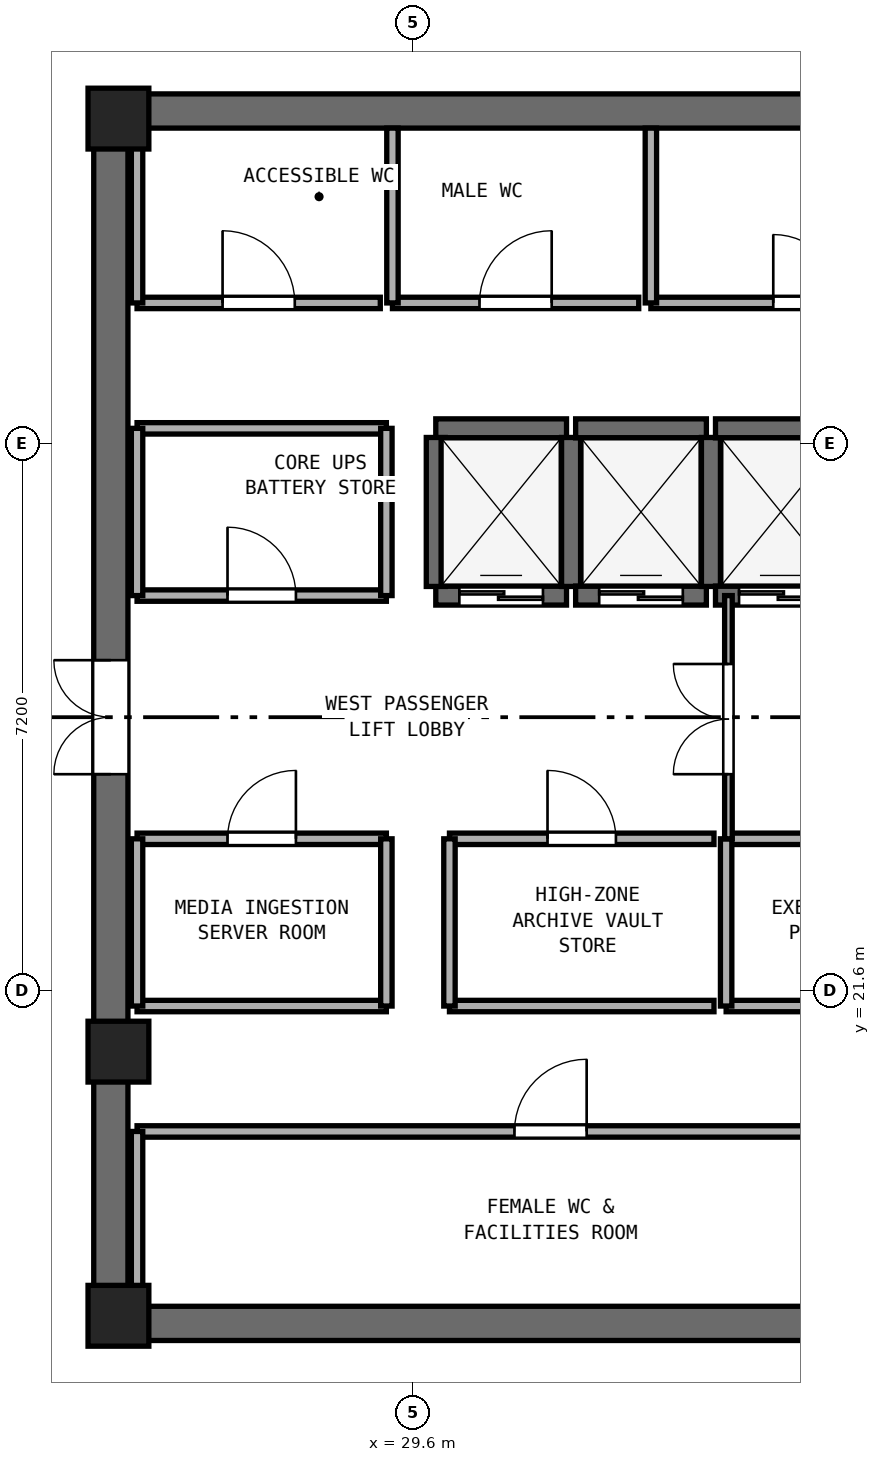
"""IFC4 building model, lengths in metres.
Left out: names, types, materials, properties, quantities, classifications, styles, units other than length and angle.
Written with IfcOpenShell. Run it as: python <this file> out.ifc"""

import sys

from ifc_helpers import new_model, si_unit, direction, frame, frame_2d, origin, origin_2d, place, context, subcontext, project, spatial, rectangle, extrude, element, fill, save


model = new_model("IFC4")
c1 = context("Model", 3, precision=1e-05, world=origin(), true_north=direction((0.0, 1.0)))
c2 = subcontext(c1, "Body", "Model", "MODEL_VIEW")
j1 = project(units=[si_unit("LENGTHUNIT", "METRE"), si_unit("PLANEANGLEUNIT", "RADIAN")], contexts=[c1])
p1 = place(None, origin())
s1 = spatial("IfcSite", under=j1, at=p1, CompositionType="ELEMENT")
p2 = place(p1, origin())
s2 = spatial("IfcBuilding", under=s1, at=p2, CompositionType="ELEMENT")
p3 = place(p2, frame((0.0, 0.0, 278.2)))
s3 = spatial("IfcBuildingStorey", under=s2, at=p3, CompositionType="ELEMENT", Elevation=278.2)
for number, where, z_axis, x_axis in (
    (1, (25.4, 17.225, 0.0), (0.0, 0.0, 1.0), (1.0, 0.0, 0.0)),
    (2, (25.4, 33.175, 0.0), (0.0, 0.0, 1.0), (1.0, 0.0, 0.0)),
):
    element("IfcWall", number, at=place(p3, frame(where, z_axis=z_axis, x_axis=x_axis)), inside=s3, PredefinedType="SHEAR", context=c2, shape_type="SweptSolid", body=[
        extrude(rectangle(XDim=23.2, YDim=0.45, at=frame_2d((11.6, 0.0))), origin(), (0.0, 0.0, 1.0), 3.54),
    ])
p4 = place(p3, frame((25.625, 17.45, 0.0), z_axis=(0.0, 0.0, 1.0), x_axis=(0.0, 1.0, 0.0)))
e3 = element("IfcWall", 3, at=p4, inside=s3, PredefinedType="SHEAR", context=c2, shape_type="SweptSolid", body=[
    extrude(rectangle(XDim=15.5, YDim=0.45, at=frame_2d((7.75, 0.0))), origin(), (0.0, 0.0, 1.0), 3.54),
])
p5 = place(p4, frame((7.0, 0.0, 0.0)))
e4 = element("IfcOpeningElement", 4, at=p5, cuts=e3, PredefinedType="OPENING", context=c2, shape_type="SweptSolid", body=[
    extrude(rectangle(XDim=1.5, YDim=2.15, at=frame_2d((0.75, 1.075))), frame((0.0, 0.235, 0.0), z_axis=(0.0, -1.0, 0.0), x_axis=(1.0, 0.0, 0.0)), (0.0, 0.0, 1.0), 0.47),
])
for number, where, z_axis, x_axis in (
    (5, (25.725, 17.325, 0.0), (0.0, 0.0, 1.0), (1.0, 0.0, 0.0)),
    (6, (25.725, 33.075, 0.0), (0.0, 0.0, 1.0), (1.0, 0.0, 0.0)),
    (7, (25.725, 20.8, 0.0), (0.0, 0.0, 1.0), (1.0, 0.0, 0.0)),
):
    element("IfcColumn", number, at=place(p3, frame(where, z_axis=z_axis, x_axis=x_axis)), inside=s3, PredefinedType="PILASTER", context=c2, shape_type="SweptSolid", body=[
        extrude(rectangle(XDim=0.8, YDim=0.8, at=origin_2d()), origin(), (0.0, 0.0, 1.0), 3.8),
    ])
p6 = place(p3, frame((29.9, 26.8, 0.0), z_axis=(0.0, 0.0, 1.0), x_axis=(1.0, 0.0, 0.0)))
e8 = element("IfcWall", 8, at=p6, inside=s3, PredefinedType="SHEAR", context=c2, shape_type="SweptSolid", body=[
    extrude(rectangle(XDim=1.72, YDim=0.25, at=frame_2d((0.86, 0.0))), origin(), (0.0, 0.0, 1.0), 3.54),
])
p7 = place(p6, frame((0.31, 0.0, 0.0)))
e9 = element("IfcOpeningElement", 9, at=p7, cuts=e8, PredefinedType="OPENING", context=c2, shape_type="SweptSolid", body=[
    extrude(rectangle(XDim=1.1, YDim=2.15, at=frame_2d((0.55, 1.075))), frame((0.0, 0.135, 0.0), z_axis=(0.0, -1.0, 0.0), x_axis=(1.0, 0.0, 0.0)), (0.0, 0.0, 1.0), 0.27),
])
p8 = place(p3, frame((29.9, 29.0, 0.0), z_axis=(0.0, 0.0, 1.0), x_axis=(1.0, 0.0, 0.0)))
e10 = element("IfcWall", 10, at=p8, inside=s3, PredefinedType="SHEAR", context=c2, shape_type="SweptSolid", body=[
    extrude(rectangle(XDim=1.72, YDim=0.25, at=frame_2d((0.86, 0.0))), origin(), (0.0, 0.0, 1.0), 3.54),
])
for number, where, z_axis, x_axis in (
    (11, (29.9, 26.92, 0.0), (0.0, 0.0, 1.0), (0.0, 1.0, 0.0)),
    (12, (31.68, 26.92, 0.0), (0.0, 0.0, 1.0), (0.0, 1.0, 0.0)),
):
    element("IfcWall", number, at=place(p3, frame(where, z_axis=z_axis, x_axis=x_axis)), inside=s3, PredefinedType="SHEAR", context=c2, shape_type="SweptSolid", body=[
        extrude(rectangle(XDim=1.96, YDim=0.25, at=frame_2d((0.98, 0.0))), origin(), (0.0, 0.0, 1.0), 3.54),
    ])
p9 = place(p3, frame((31.74, 26.8, 0.0), z_axis=(0.0, 0.0, 1.0), x_axis=(1.0, 0.0, 0.0)))
e13 = element("IfcWall", 13, at=p9, inside=s3, PredefinedType="SHEAR", context=c2, shape_type="SweptSolid", body=[
    extrude(rectangle(XDim=1.72, YDim=0.25, at=frame_2d((0.86, 0.0))), origin(), (0.0, 0.0, 1.0), 3.54),
])
p10 = place(p9, frame((0.31, 0.0, 0.0)))
e14 = element("IfcOpeningElement", 14, at=p10, cuts=e13, PredefinedType="OPENING", context=c2, shape_type="SweptSolid", body=[
    extrude(rectangle(XDim=1.1, YDim=2.15, at=frame_2d((0.55, 1.075))), frame((0.0, 0.135, 0.0), z_axis=(0.0, -1.0, 0.0), x_axis=(1.0, 0.0, 0.0)), (0.0, 0.0, 1.0), 0.27),
])
p11 = place(p3, frame((31.74, 29.0, 0.0), z_axis=(0.0, 0.0, 1.0), x_axis=(1.0, 0.0, 0.0)))
e15 = element("IfcWall", 15, at=p11, inside=s3, PredefinedType="SHEAR", context=c2, shape_type="SweptSolid", body=[
    extrude(rectangle(XDim=1.72, YDim=0.25, at=frame_2d((0.86, 0.0))), origin(), (0.0, 0.0, 1.0), 3.54),
])
p12 = place(p3, frame((33.52, 26.92, 0.0), z_axis=(0.0, 0.0, 1.0), x_axis=(0.0, 1.0, 0.0)))
e16 = element("IfcWall", 16, at=p12, inside=s3, PredefinedType="SHEAR", context=c2, shape_type="SweptSolid", body=[
    extrude(rectangle(XDim=1.96, YDim=0.25, at=frame_2d((0.98, 0.0))), origin(), (0.0, 0.0, 1.0), 3.54),
])
p13 = place(p3, frame((33.58, 26.8, 0.0), z_axis=(0.0, 0.0, 1.0), x_axis=(1.0, 0.0, 0.0)))
e17 = element("IfcWall", 17, at=p13, inside=s3, PredefinedType="SHEAR", context=c2, shape_type="SweptSolid", body=[
    extrude(rectangle(XDim=1.72, YDim=0.25, at=frame_2d((0.86, 0.0))), origin(), (0.0, 0.0, 1.0), 3.54),
])
p14 = place(p13, frame((0.31, 0.0, 0.0)))
e18 = element("IfcOpeningElement", 18, at=p14, cuts=e17, PredefinedType="OPENING", context=c2, shape_type="SweptSolid", body=[
    extrude(rectangle(XDim=1.1, YDim=2.15, at=frame_2d((0.55, 1.075))), frame((0.0, 0.135, 0.0), z_axis=(0.0, -1.0, 0.0), x_axis=(1.0, 0.0, 0.0)), (0.0, 0.0, 1.0), 0.27),
])
p15 = place(p3, frame((33.58, 29.0, 0.0), z_axis=(0.0, 0.0, 1.0), x_axis=(1.0, 0.0, 0.0)))
e19 = element("IfcWall", 19, at=p15, inside=s3, PredefinedType="SHEAR", context=c2, shape_type="SweptSolid", body=[
    extrude(rectangle(XDim=1.72, YDim=0.25, at=frame_2d((0.86, 0.0))), origin(), (0.0, 0.0, 1.0), 3.54),
])
p16 = place(p3, frame((25.97, 30.65, 0.0), z_axis=(0.0, 0.0, 1.0), x_axis=(1.0, 0.0, 0.0)))
e20 = element("IfcWall", 20, at=p16, inside=s3, PredefinedType="PARTITIONING", context=c2, shape_type="SweptSolid", body=[
    extrude(rectangle(XDim=3.2, YDim=0.15, at=frame_2d((1.6, 0.0))), origin(), (0.0, 0.0, 1.0), 3.54),
])
p17 = place(p16, frame((1.125, 0.0, 0.0)))
e21 = element("IfcOpeningElement", 21, at=p17, cuts=e20, PredefinedType="OPENING", context=c2, shape_type="SweptSolid", body=[
    extrude(rectangle(XDim=0.95, YDim=2.1, at=frame_2d((0.475, 1.05))), frame((0.0, 0.085, 0.0), z_axis=(0.0, -1.0, 0.0), x_axis=(1.0, 0.0, 0.0)), (0.0, 0.0, 1.0), 0.17),
])
p18 = place(p3, frame((25.97, 30.65, 0.0), z_axis=(0.0, 0.0, 1.0), x_axis=(0.0, 1.0, 0.0)))
e22 = element("IfcWall", 22, at=p18, inside=s3, PredefinedType="PARTITIONING", context=c2, shape_type="SweptSolid", body=[
    extrude(rectangle(XDim=2.3, YDim=0.15, at=frame_2d((1.15, 0.0))), origin(), (0.0, 0.0, 1.0), 2.64),
])
p19 = place(p3, frame((29.33, 30.65, 0.0), z_axis=(0.0, 0.0, 1.0), x_axis=(1.0, 0.0, 0.0)))
e23 = element("IfcWall", 23, at=p19, inside=s3, PredefinedType="PARTITIONING", context=c2, shape_type="SweptSolid", body=[
    extrude(rectangle(XDim=3.24, YDim=0.15, at=frame_2d((1.62, 0.0))), origin(), (0.0, 0.0, 1.0), 3.54),
])
p20 = place(p19, frame((1.145, 0.0, 0.0)))
e24 = element("IfcOpeningElement", 24, at=p20, cuts=e23, PredefinedType="OPENING", context=c2, shape_type="SweptSolid", body=[
    extrude(rectangle(XDim=0.95, YDim=2.1, at=frame_2d((0.475, 1.05))), frame((0.0, 0.085, 0.0), z_axis=(0.0, -1.0, 0.0), x_axis=(1.0, 0.0, 0.0)), (0.0, 0.0, 1.0), 0.17),
])
p21 = place(p3, frame((29.33, 30.65, 0.0), z_axis=(0.0, 0.0, 1.0), x_axis=(0.0, 1.0, 0.0)))
e25 = element("IfcWall", 25, at=p21, inside=s3, PredefinedType="PARTITIONING", context=c2, shape_type="SweptSolid", body=[
    extrude(rectangle(XDim=2.3, YDim=0.15, at=frame_2d((1.15, 0.0))), origin(), (0.0, 0.0, 1.0), 3.54),
])
p22 = place(p3, frame((32.73, 30.65, 0.0), z_axis=(0.0, 0.0, 1.0), x_axis=(1.0, 0.0, 0.0)))
e26 = element("IfcWall", 26, at=p22, inside=s3, PredefinedType="PARTITIONING", context=c2, shape_type="SweptSolid", body=[
    extrude(rectangle(XDim=4.12, YDim=0.15, at=frame_2d((2.06, 0.0))), origin(), (0.0, 0.0, 1.0), 3.54),
])
p23 = place(p22, frame((1.61, 0.0, 0.0)))
e27 = element("IfcOpeningElement", 27, at=p23, cuts=e26, PredefinedType="OPENING", context=c2, shape_type="SweptSolid", body=[
    extrude(rectangle(XDim=0.9, YDim=2.1, at=frame_2d((0.45, 1.05))), frame((0.0, 0.085, 0.0), z_axis=(0.0, -1.0, 0.0), x_axis=(1.0, 0.0, 0.0)), (0.0, 0.0, 1.0), 0.17),
])
p24 = place(p3, frame((32.73, 30.65, 0.0), z_axis=(0.0, 0.0, 1.0), x_axis=(0.0, 1.0, 0.0)))
e28 = element("IfcWall", 28, at=p24, inside=s3, PredefinedType="PARTITIONING", context=c2, shape_type="SweptSolid", body=[
    extrude(rectangle(XDim=2.3, YDim=0.15, at=frame_2d((1.15, 0.0))), origin(), (0.0, 0.0, 1.0), 3.54),
])
p25 = place(p3, frame((25.97, 19.75, 0.0), z_axis=(0.0, 0.0, 1.0), x_axis=(1.0, 0.0, 0.0)))
e29 = element("IfcWall", 29, at=p25, inside=s3, PredefinedType="PARTITIONING", context=c2, shape_type="SweptSolid", body=[
    extrude(rectangle(XDim=10.88, YDim=0.15, at=frame_2d((5.44, 0.0))), origin(), (0.0, 0.0, 1.0), 3.54),
])
p26 = place(p25, frame((4.965, 0.0, 0.0)))
e30 = element("IfcOpeningElement", 30, at=p26, cuts=e29, PredefinedType="OPENING", context=c2, shape_type="SweptSolid", body=[
    extrude(rectangle(XDim=0.95, YDim=2.1, at=frame_2d((0.475, 1.05))), frame((0.0, 0.085, 0.0), z_axis=(0.0, -1.0, 0.0), x_axis=(1.0, 0.0, 0.0)), (0.0, 0.0, 1.0), 0.17),
])
p27 = place(p3, frame((25.97, 17.45, 0.0), z_axis=(0.0, 0.0, 1.0), x_axis=(0.0, 1.0, 0.0)))
e31 = element("IfcWall", 31, at=p27, inside=s3, PredefinedType="PARTITIONING", context=c2, shape_type="SweptSolid", body=[
    extrude(rectangle(XDim=2.3, YDim=0.15, at=frame_2d((1.15, 0.0))), origin(), (0.0, 0.0, 1.0), 2.64),
])
p28 = place(p3, frame((25.97, 26.8, 0.0), z_axis=(0.0, 0.0, 1.0), x_axis=(1.0, 0.0, 0.0)))
e32 = element("IfcWall", 32, at=p28, inside=s3, PredefinedType="PARTITIONING", context=c2, shape_type="SweptSolid", body=[
    extrude(rectangle(XDim=3.28, YDim=0.15, at=frame_2d((1.64, 0.0))), origin(), (0.0, 0.0, 1.0), 3.54),
])
p29 = place(p28, frame((1.19, 0.0, 0.0)))
e33 = element("IfcOpeningElement", 33, at=p29, cuts=e32, PredefinedType="OPENING", context=c2, shape_type="SweptSolid", body=[
    extrude(rectangle(XDim=0.9, YDim=2.1, at=frame_2d((0.45, 1.05))), frame((0.0, 0.085, 0.0), z_axis=(0.0, -1.0, 0.0), x_axis=(1.0, 0.0, 0.0)), (0.0, 0.0, 1.0), 0.17),
])
p30 = place(p3, frame((25.97, 29.0, 0.0), z_axis=(0.0, 0.0, 1.0), x_axis=(1.0, 0.0, 0.0)))
e34 = element("IfcWall", 34, at=p30, inside=s3, PredefinedType="PARTITIONING", context=c2, shape_type="SweptSolid", body=[
    extrude(rectangle(XDim=3.28, YDim=0.15, at=frame_2d((1.64, 0.0))), origin(), (0.0, 0.0, 1.0), 3.54),
])
p31 = place(p3, frame((25.97, 26.8, 0.0), z_axis=(0.0, 0.0, 1.0), x_axis=(0.0, 1.0, 0.0)))
e35 = element("IfcWall", 35, at=p31, inside=s3, PredefinedType="PARTITIONING", context=c2, shape_type="SweptSolid", body=[
    extrude(rectangle(XDim=2.2, YDim=0.15, at=frame_2d((1.1, 0.0))), origin(), (0.0, 0.0, 1.0), 2.64),
])
p32 = place(p3, frame((29.25, 26.8, 0.0), z_axis=(0.0, 0.0, 1.0), x_axis=(0.0, 1.0, 0.0)))
e36 = element("IfcWall", 36, at=p32, inside=s3, PredefinedType="PARTITIONING", context=c2, shape_type="SweptSolid", body=[
    extrude(rectangle(XDim=2.2, YDim=0.15, at=frame_2d((1.1, 0.0))), origin(), (0.0, 0.0, 1.0), 3.54),
])
p33 = place(p3, frame((25.97, 21.4, 0.0), z_axis=(0.0, 0.0, 1.0), x_axis=(1.0, 0.0, 0.0)))
e37 = element("IfcWall", 37, at=p33, inside=s3, PredefinedType="PARTITIONING", context=c2, shape_type="SweptSolid", body=[
    extrude(rectangle(XDim=3.28, YDim=0.15, at=frame_2d((1.64, 0.0))), origin(), (0.0, 0.0, 1.0), 3.54),
])
p34 = place(p3, frame((25.97, 23.6, 0.0), z_axis=(0.0, 0.0, 1.0), x_axis=(1.0, 0.0, 0.0)))
e38 = element("IfcWall", 38, at=p34, inside=s3, PredefinedType="PARTITIONING", context=c2, shape_type="SweptSolid", body=[
    extrude(rectangle(XDim=3.28, YDim=0.15, at=frame_2d((1.64, 0.0))), origin(), (0.0, 0.0, 1.0), 3.54),
])
p35 = place(p34, frame((1.19, 0.0, 0.0)))
e39 = element("IfcOpeningElement", 39, at=p35, cuts=e38, PredefinedType="OPENING", context=c2, shape_type="SweptSolid", body=[
    extrude(rectangle(XDim=0.9, YDim=2.1, at=frame_2d((0.45, 1.05))), frame((0.0, 0.085, 0.0), z_axis=(0.0, -1.0, 0.0), x_axis=(1.0, 0.0, 0.0)), (0.0, 0.0, 1.0), 0.17),
])
p36 = place(p3, frame((25.97, 21.4, 0.0), z_axis=(0.0, 0.0, 1.0), x_axis=(0.0, 1.0, 0.0)))
e40 = element("IfcWall", 40, at=p36, inside=s3, PredefinedType="PARTITIONING", context=c2, shape_type="SweptSolid", body=[
    extrude(rectangle(XDim=2.2, YDim=0.15, at=frame_2d((1.1, 0.0))), origin(), (0.0, 0.0, 1.0), 2.64),
])
p37 = place(p3, frame((29.25, 21.4, 0.0), z_axis=(0.0, 0.0, 1.0), x_axis=(0.0, 1.0, 0.0)))
e41 = element("IfcWall", 41, at=p37, inside=s3, PredefinedType="PARTITIONING", context=c2, shape_type="SweptSolid", body=[
    extrude(rectangle(XDim=2.2, YDim=0.15, at=frame_2d((1.1, 0.0))), origin(), (0.0, 0.0, 1.0), 3.54),
])
p38 = place(p3, frame((30.08, 21.4, 0.0), z_axis=(0.0, 0.0, 1.0), x_axis=(1.0, 0.0, 0.0)))
e42 = element("IfcWall", 42, at=p38, inside=s3, PredefinedType="PARTITIONING", context=c2, shape_type="SweptSolid", body=[
    extrude(rectangle(XDim=3.48, YDim=0.15, at=frame_2d((1.74, 0.0))), origin(), (0.0, 0.0, 1.0), 3.54),
])
p39 = place(p3, frame((30.08, 23.6, 0.0), z_axis=(0.0, 0.0, 1.0), x_axis=(1.0, 0.0, 0.0)))
e43 = element("IfcWall", 43, at=p39, inside=s3, PredefinedType="PARTITIONING", context=c2, shape_type="SweptSolid", body=[
    extrude(rectangle(XDim=3.48, YDim=0.15, at=frame_2d((1.74, 0.0))), origin(), (0.0, 0.0, 1.0), 3.54),
])
p40 = place(p39, frame((1.29, 0.0, 0.0)))
e44 = element("IfcOpeningElement", 44, at=p40, cuts=e43, PredefinedType="OPENING", context=c2, shape_type="SweptSolid", body=[
    extrude(rectangle(XDim=0.9, YDim=2.1, at=frame_2d((0.45, 1.05))), frame((0.0, 0.085, 0.0), z_axis=(0.0, -1.0, 0.0), x_axis=(1.0, 0.0, 0.0)), (0.0, 0.0, 1.0), 0.17),
])
p41 = place(p3, frame((30.08, 21.4, 0.0), z_axis=(0.0, 0.0, 1.0), x_axis=(0.0, 1.0, 0.0)))
e45 = element("IfcWall", 45, at=p41, inside=s3, PredefinedType="PARTITIONING", context=c2, shape_type="SweptSolid", body=[
    extrude(rectangle(XDim=2.2, YDim=0.15, at=frame_2d((1.1, 0.0))), origin(), (0.0, 0.0, 1.0), 3.54),
])
p42 = place(p3, frame((33.72, 21.4, 0.0), z_axis=(0.0, 0.0, 1.0), x_axis=(1.0, 0.0, 0.0)))
e46 = element("IfcWall", 46, at=p42, inside=s3, PredefinedType="PARTITIONING", context=c2, shape_type="SweptSolid", body=[
    extrude(rectangle(XDim=3.48, YDim=0.15, at=frame_2d((1.74, 0.0))), origin(), (0.0, 0.0, 1.0), 3.54),
])
p43 = place(p3, frame((33.72, 23.6, 0.0), z_axis=(0.0, 0.0, 1.0), x_axis=(1.0, 0.0, 0.0)))
e47 = element("IfcWall", 47, at=p43, inside=s3, PredefinedType="PARTITIONING", context=c2, shape_type="SweptSolid", body=[
    extrude(rectangle(XDim=3.48, YDim=0.15, at=frame_2d((1.74, 0.0))), origin(), (0.0, 0.0, 1.0), 3.54),
])
p44 = place(p43, frame((1.29, 0.0, 0.0)))
e48 = element("IfcOpeningElement", 48, at=p44, cuts=e47, PredefinedType="OPENING", context=c2, shape_type="SweptSolid", body=[
    extrude(rectangle(XDim=0.9, YDim=2.1, at=frame_2d((0.45, 1.05))), frame((0.0, 0.085, 0.0), z_axis=(0.0, -1.0, 0.0), x_axis=(1.0, 0.0, 0.0)), (0.0, 0.0, 1.0), 0.17),
])
p45 = place(p3, frame((33.72, 21.4, 0.0), z_axis=(0.0, 0.0, 1.0), x_axis=(0.0, 1.0, 0.0)))
e49 = element("IfcWall", 49, at=p45, inside=s3, PredefinedType="PARTITIONING", context=c2, shape_type="SweptSolid", body=[
    extrude(rectangle(XDim=2.2, YDim=0.15, at=frame_2d((1.1, 0.0))), origin(), (0.0, 0.0, 1.0), 3.54),
])
p46 = place(p3, frame((33.75, 23.6, 0.0), z_axis=(0.0, 0.0, 1.0), x_axis=(0.0, 1.0, 0.0)))
e50 = element("IfcWall", 50, at=p46, inside=s3, PredefinedType="PARTITIONING", context=c2, shape_type="SweptSolid", body=[
    extrude(rectangle(XDim=3.2, YDim=0.1, at=frame_2d((1.6, 0.0))), origin(), (0.0, 0.0, 1.0), 3.54),
])
p47 = place(p46, frame((0.85, 0.0, 0.0)))
e51 = element("IfcOpeningElement", 51, at=p47, cuts=e50, PredefinedType="OPENING", context=c2, shape_type="SweptSolid", body=[
    extrude(rectangle(XDim=1.45, YDim=2.12, at=frame_2d((0.725, 1.06))), frame((0.0, 0.06, 0.0), z_axis=(0.0, -1.0, 0.0), x_axis=(1.0, 0.0, 0.0)), (0.0, 0.0, 1.0), 0.12),
])
p48 = place(p7, origin())
e52 = element("IfcDoor", 52, at=p48, inside=s3, OperationType="DOUBLE_DOOR_SLIDING", PredefinedType="DOOR", context=c2, shape_type="SweptSolid", body=[
    extrude(rectangle(XDim=1.1, YDim=2.15, at=frame_2d((0.55, 1.075))), frame((0.0, 0.025, 0.0), z_axis=(0.0, -1.0, 0.0), x_axis=(1.0, 0.0, 0.0)), (0.0, 0.0, 1.0), 0.05),
])
fill(e9, e52)
p49 = place(p10, origin())
e53 = element("IfcDoor", 53, at=p49, inside=s3, OperationType="DOUBLE_DOOR_SLIDING", PredefinedType="DOOR", context=c2, shape_type="SweptSolid", body=[
    extrude(rectangle(XDim=1.1, YDim=2.15, at=frame_2d((0.55, 1.075))), frame((0.0, 0.025, 0.0), z_axis=(0.0, -1.0, 0.0), x_axis=(1.0, 0.0, 0.0)), (0.0, 0.0, 1.0), 0.05),
])
fill(e14, e53)
p50 = place(p14, origin())
e54 = element("IfcDoor", 54, at=p50, inside=s3, OperationType="DOUBLE_DOOR_SLIDING", PredefinedType="DOOR", context=c2, shape_type="SweptSolid", body=[
    extrude(rectangle(XDim=1.1, YDim=2.15, at=frame_2d((0.55, 1.075))), frame((0.0, 0.025, 0.0), z_axis=(0.0, -1.0, 0.0), x_axis=(1.0, 0.0, 0.0)), (0.0, 0.0, 1.0), 0.05),
])
fill(e18, e54)
p51 = place(p5, origin())
e55 = element("IfcDoor", 55, at=p51, inside=s3, OperationType="DOUBLE_DOOR_SINGLE_SWING", PredefinedType="DOOR", context=c2, shape_type="SweptSolid", body=[
    extrude(rectangle(XDim=1.5, YDim=2.15, at=frame_2d((0.75, 1.075))), frame((0.0, 0.025, 0.0), z_axis=(0.0, -1.0, 0.0), x_axis=(1.0, 0.0, 0.0)), (0.0, 0.0, 1.0), 0.05),
])
fill(e4, e55)
p52 = place(p17, origin())
e56 = element("IfcDoor", 56, at=p52, inside=s3, OperationType="SINGLE_SWING_LEFT", PredefinedType="DOOR", context=c2, shape_type="SweptSolid", body=[
    extrude(rectangle(XDim=0.95, YDim=2.1, at=frame_2d((0.475, 1.05))), frame((0.0, 0.025, 0.0), z_axis=(0.0, -1.0, 0.0), x_axis=(1.0, 0.0, 0.0)), (0.0, 0.0, 1.0), 0.05),
])
fill(e21, e56)
p53 = place(p20, origin())
e57 = element("IfcDoor", 57, at=p53, inside=s3, OperationType="SINGLE_SWING_RIGHT", PredefinedType="DOOR", context=c2, shape_type="SweptSolid", body=[
    extrude(rectangle(XDim=0.95, YDim=2.1, at=frame_2d((0.475, 1.05))), frame((0.0, 0.025, 0.0), z_axis=(0.0, -1.0, 0.0), x_axis=(1.0, 0.0, 0.0)), (0.0, 0.0, 1.0), 0.05),
])
fill(e24, e57)
p54 = place(p23, origin())
e58 = element("IfcDoor", 58, at=p54, inside=s3, OperationType="SINGLE_SWING_LEFT", PredefinedType="DOOR", context=c2, shape_type="SweptSolid", body=[
    extrude(rectangle(XDim=0.9, YDim=2.1, at=frame_2d((0.45, 1.05))), frame((0.0, 0.025, 0.0), z_axis=(0.0, -1.0, 0.0), x_axis=(1.0, 0.0, 0.0)), (0.0, 0.0, 1.0), 0.05),
])
fill(e27, e58)
p55 = place(p26, origin())
e59 = element("IfcDoor", 59, at=p55, inside=s3, OperationType="SINGLE_SWING_RIGHT", PredefinedType="DOOR", context=c2, shape_type="SweptSolid", body=[
    extrude(rectangle(XDim=0.95, YDim=2.1, at=frame_2d((0.475, 1.05))), frame((0.0, 0.025, 0.0), z_axis=(0.0, -1.0, 0.0), x_axis=(1.0, 0.0, 0.0)), (0.0, 0.0, 1.0), 0.05),
])
fill(e30, e59)
p56 = place(p29, origin())
e60 = element("IfcDoor", 60, at=p56, inside=s3, OperationType="SINGLE_SWING_LEFT", PredefinedType="DOOR", context=c2, shape_type="SweptSolid", body=[
    extrude(rectangle(XDim=0.9, YDim=2.1, at=frame_2d((0.45, 1.05))), frame((0.0, 0.025, 0.0), z_axis=(0.0, -1.0, 0.0), x_axis=(1.0, 0.0, 0.0)), (0.0, 0.0, 1.0), 0.05),
])
fill(e33, e60)
p57 = place(p35, origin())
e61 = element("IfcDoor", 61, at=p57, inside=s3, OperationType="SINGLE_SWING_RIGHT", PredefinedType="DOOR", context=c2, shape_type="SweptSolid", body=[
    extrude(rectangle(XDim=0.9, YDim=2.1, at=frame_2d((0.45, 1.05))), frame((0.0, 0.025, 0.0), z_axis=(0.0, -1.0, 0.0), x_axis=(1.0, 0.0, 0.0)), (0.0, 0.0, 1.0), 0.05),
])
fill(e39, e61)
p58 = place(p40, origin())
e62 = element("IfcDoor", 62, at=p58, inside=s3, OperationType="SINGLE_SWING_LEFT", PredefinedType="DOOR", context=c2, shape_type="SweptSolid", body=[
    extrude(rectangle(XDim=0.9, YDim=2.1, at=frame_2d((0.45, 1.05))), frame((0.0, 0.025, 0.0), z_axis=(0.0, -1.0, 0.0), x_axis=(1.0, 0.0, 0.0)), (0.0, 0.0, 1.0), 0.05),
])
fill(e44, e62)
p59 = place(p47, origin())
e63 = element("IfcDoor", 63, at=p59, inside=s3, OperationType="DOUBLE_DOOR_SINGLE_SWING", PredefinedType="DOOR", context=c2, shape_type="SweptSolid", body=[
    extrude(rectangle(XDim=1.45, YDim=2.12, at=frame_2d((0.725, 1.06))), frame((0.0, 0.025, 0.0), z_axis=(0.0, -1.0, 0.0), x_axis=(1.0, 0.0, 0.0)), (0.0, 0.0, 1.0), 0.05),
])
fill(e51, e63)
save(model, sys.argv[1])
